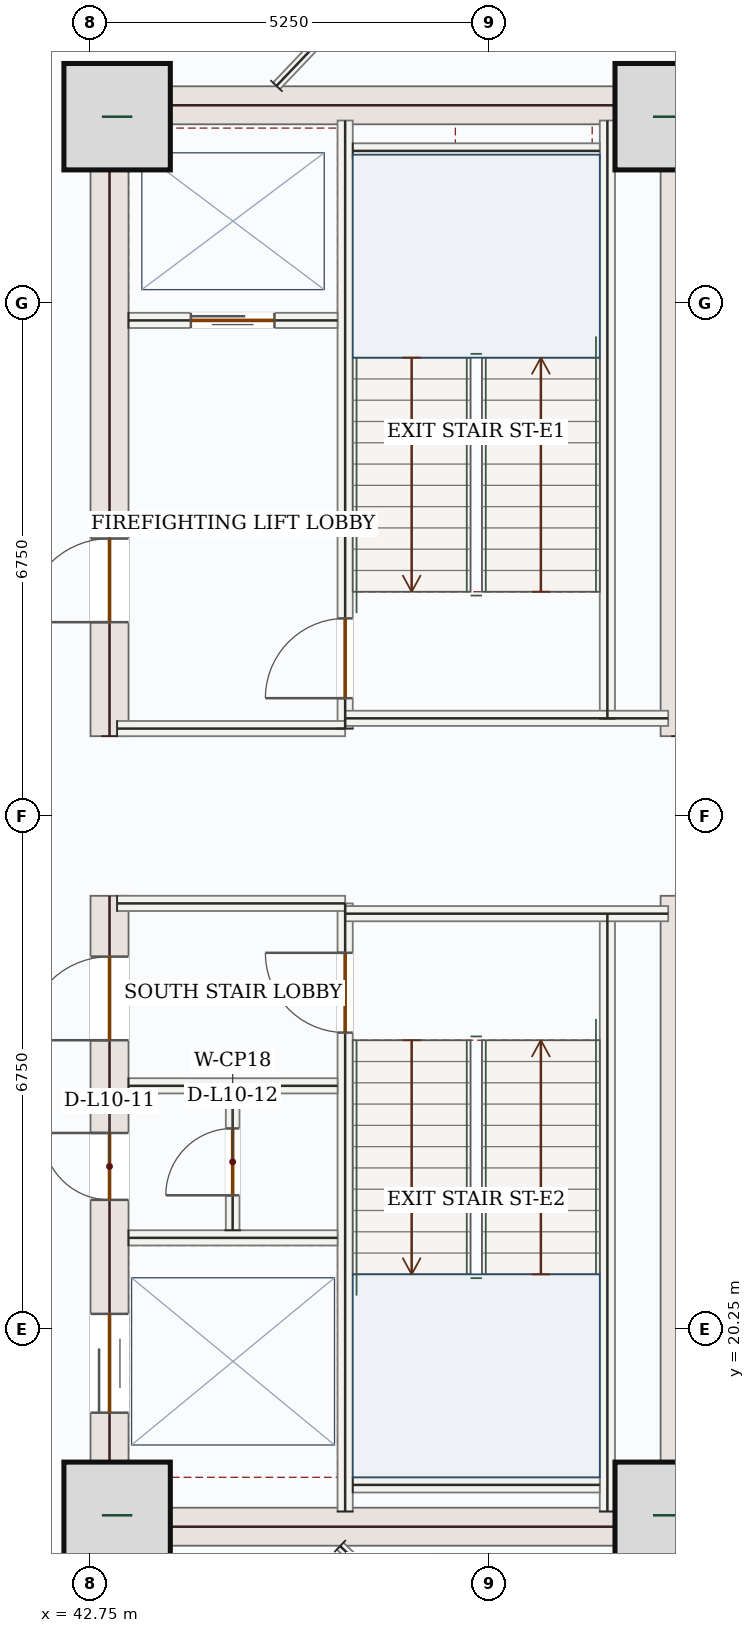
"""IFC4 building model, lengths in metres.
Left out: names, types, materials, properties, quantities, classifications, styles, units other than length and angle.
Written with IfcOpenShell. Run it as: python <this file> out.ifc"""

import sys

from ifc_helpers import new_model, si_unit, direction, frame, frame_2d, origin, origin_2d, place, context, subcontext, project, spatial, rectangle, extrude, source, transform, mapped, element, fill, save


model = new_model("IFC4")
c1 = context("Model", 3, precision=1e-05, world=origin(), true_north=direction((0.0, 1.0)))
c2 = subcontext(c1, "Body", "Model", "MODEL_VIEW")
j1 = project(units=[si_unit("LENGTHUNIT", "METRE"), si_unit("PLANEANGLEUNIT", "RADIAN")], contexts=[c1])
p1 = place(None, origin())
s1 = spatial("IfcSite", under=j1, at=p1, CompositionType="ELEMENT")
p2 = place(p1, origin())
s2 = spatial("IfcBuilding", under=s1, at=p2, CompositionType="ELEMENT")
p3 = place(p2, frame((0.0, 0.0, 50.1)))
s3 = spatial("IfcBuildingStorey", under=s2, at=p3, CompositionType="ELEMENT", Elevation=50.1)
p4 = place(p3, frame((43.0, 17.4, 0.0), z_axis=(0.0, 0.0, 1.0), x_axis=(0.0, 1.0, 0.0)))
e1 = element("IfcWall", 1, at=p4, inside=s3, PredefinedType="SHEAR", context=c2, shape_type="SweptSolid", body=[
    extrude(rectangle(XDim=8.55, YDim=0.5, at=frame_2d((4.275, 0.0))), origin(), (0.0, 0.0, 1.0), 3.95),
])
p5 = place(p4, frame((6.65, 0.0, 0.0)))
e2 = element("IfcOpeningElement", 2, at=p5, cuts=e1, PredefinedType="OPENING", context=c2, shape_type="SweptSolid", body=[
    extrude(rectangle(XDim=1.1, YDim=2.2, at=frame_2d((0.55, 1.1))), frame((0.0, 0.26, 0.0), z_axis=(0.0, -1.0, 0.0), x_axis=(1.0, 0.0, 0.0)), (0.0, 0.0, 1.0), 0.52),
])
p6 = place(p4, frame((1.75, 0.0, 0.0)))
e3 = element("IfcOpeningElement", 3, at=p6, cuts=e1, PredefinedType="OPENING", context=c2, shape_type="SweptSolid", body=[
    extrude(rectangle(XDim=1.3, YDim=2.2, at=frame_2d((0.65, 1.1))), frame((0.0, 0.26, 0.0), z_axis=(0.0, -1.0, 0.0), x_axis=(1.0, 0.0, 0.0)), (0.0, 0.0, 1.0), 0.52),
])
p7 = place(p4, frame((4.55, 0.0, 0.0)))
e4 = element("IfcOpeningElement", 4, at=p7, cuts=e1, PredefinedType="OPENING", context=c2, shape_type="SweptSolid", body=[
    extrude(rectangle(XDim=0.88, YDim=2.1, at=frame_2d((0.44, 1.05))), frame((0.0, 0.26, 0.0), z_axis=(0.0, -1.0, 0.0), x_axis=(1.0, 0.0, 0.0)), (0.0, 0.0, 1.0), 0.52),
])
p8 = place(p3, frame((43.0, 28.05, 0.0), z_axis=(0.0, 0.0, 1.0), x_axis=(0.0, 1.0, 0.0)))
e5 = element("IfcWall", 5, at=p8, inside=s3, PredefinedType="SHEAR", context=c2, shape_type="SweptSolid", body=[
    extrude(rectangle(XDim=8.55, YDim=0.5, at=frame_2d((4.275, 0.0))), origin(), (0.0, 0.0, 1.0), 3.95),
])
p9 = place(p8, frame((1.5, 0.0, 0.0)))
e6 = element("IfcOpeningElement", 6, at=p9, cuts=e5, PredefinedType="OPENING", context=c2, shape_type="SweptSolid", body=[
    extrude(rectangle(XDim=1.1, YDim=2.2, at=frame_2d((0.55, 1.1))), frame((0.0, 0.26, 0.0), z_axis=(0.0, -1.0, 0.0), x_axis=(1.0, 0.0, 0.0)), (0.0, 0.0, 1.0), 0.52),
])
m1 = source(origin(), c2, "Body", "SweptSolid", [
    extrude(rectangle(XDim=8.55, YDim=0.5, at=frame_2d((4.275, 0.0))), origin(), (0.0, 0.0, 1.0), 3.95),
])
for number, where, z_axis, x_axis in (
    (7, (50.5, 17.4, 0.0), (0.0, 0.0, 1.0), (0.0, 1.0, 0.0)),
    (8, (50.5, 28.05, 0.0), (0.0, 0.0, 1.0), (0.0, 1.0, 0.0)),
):
    element("IfcWall", number, at=place(p3, frame(where, z_axis=z_axis, x_axis=x_axis)), inside=s3, PredefinedType="SHEAR", context=c2, shape_type="MappedRepresentation", body=[
        mapped(m1, transform((0.0, 0.0, 0.0), x_axis=(1.0, 0.0, 0.0), y_axis=(0.0, 1.0, 0.0), z_axis=(0.0, 0.0, 1.0), scale=1.0)),
    ])
m2 = source(origin(), c2, "Body", "SweptSolid", [
    extrude(rectangle(XDim=7.0, YDim=0.5, at=frame_2d((3.5, 0.0))), origin(), (0.0, 0.0, 1.0), 3.95),
])
for number, where, z_axis, x_axis in (
    (9, (43.25, 17.65, 0.0), (0.0, 0.0, 1.0), (1.0, 0.0, 0.0)),
    (10, (43.25, 36.35, 0.0), (0.0, 0.0, 1.0), (1.0, 0.0, 0.0)),
):
    element("IfcWall", number, at=place(p3, frame(where, z_axis=z_axis, x_axis=x_axis)), inside=s3, PredefinedType="SHEAR", context=c2, shape_type="MappedRepresentation", body=[
        mapped(m2, transform((0.0, 0.0, 0.0), x_axis=(1.0, 0.0, 0.0), y_axis=(0.0, 1.0, 0.0), z_axis=(0.0, 0.0, 1.0), scale=1.0)),
    ])
m3 = source(origin(), c2, "Body", "SweptSolid", [
    extrude(rectangle(XDim=1.4, YDim=1.4, at=origin_2d()), origin(), (0.0, 0.0, 1.0), 4.2),
])
for number, where, z_axis, x_axis in (
    (11, (43.1, 17.8, 0.0), (0.0, 0.0, 1.0), (1.0, 0.0, 0.0)),
    (12, (50.35, 17.8, 0.0), (0.0, 0.0, 1.0), (1.0, 0.0, 0.0)),
    (13, (43.1, 36.2, 0.0), (0.0, 0.0, 1.0), (1.0, 0.0, 0.0)),
    (14, (50.35, 36.2, 0.0), (0.0, 0.0, 1.0), (1.0, 0.0, 0.0)),
):
    element("IfcColumn", number, at=place(p3, frame(where, z_axis=z_axis, x_axis=x_axis)), inside=s3, PredefinedType="COLUMN", context=c2, shape_type="MappedRepresentation", body=[
        mapped(m3, transform((0.0, 0.0, 0.0), x_axis=(1.0, 0.0, 0.0), y_axis=(0.0, 1.0, 0.0), z_axis=(0.0, 0.0, 1.0), scale=1.0)),
    ])
p10 = place(p3, frame((53.06, 18.458, 0.0), z_axis=(0.0, 0.0, 1.0), x_axis=(-0.707106781187, -0.707106781187, 0.0)))
e15 = element("IfcWall", 15, at=p10, inside=s3, PredefinedType="SOLIDWALL", context=c2, shape_type="SweptSolid", body=[
    extrude(rectangle(XDim=5.258, YDim=0.32, at=frame_2d((2.629, 0.0))), origin(), (0.0, 0.0, 1.0), 3.95),
])
p11 = place(p10, frame((1.429, 0.0, 0.85)))
e16 = element("IfcOpeningElement", 16, at=p11, cuts=e15, PredefinedType="OPENING", context=c2, shape_type="SweptSolid", body=[
    extrude(rectangle(XDim=2.4, YDim=1.8, at=frame_2d((1.2, 0.9))), frame((0.0, 0.17, 0.0), z_axis=(0.0, -1.0, 0.0), x_axis=(1.0, 0.0, 0.0)), (0.0, 0.0, 1.0), 0.34),
])
m4 = source(origin(), c2, "Body", "SweptSolid", [
    extrude(rectangle(XDim=5.258, YDim=0.32, at=frame_2d((2.629, 0.0))), origin(), (0.0, 0.0, 1.0), 3.95),
])
p12 = place(p3, frame((49.342, 39.26, 0.0), z_axis=(0.0, 0.0, 1.0), x_axis=(0.707106781187, -0.707106781187, 0.0)))
e17 = element("IfcWall", 17, at=p12, inside=s3, PredefinedType="SOLIDWALL", context=c2, shape_type="MappedRepresentation", body=[
    mapped(m4, transform((0.0, 0.0, 0.0), x_axis=(1.0, 0.0, 0.0), y_axis=(0.0, 1.0, 0.0), z_axis=(0.0, 0.0, 1.0), scale=1.0)),
])
m5 = source(origin(), c2, "Body", "SweptSolid", [
    extrude(rectangle(XDim=7.87, YDim=0.2, at=frame_2d((3.935, 0.0))), origin(), (0.0, 0.0, 1.0), 3.95),
])
for number, where, z_axis, x_axis in (
    (18, (49.55, 17.85, 0.0), (0.0, 0.0, 1.0), (0.0, 1.0, 0.0)),
    (19, (49.55, 28.28, 0.0), (0.0, 0.0, 1.0), (0.0, 1.0, 0.0)),
):
    element("IfcWall", number, at=place(p3, frame(where, z_axis=z_axis, x_axis=x_axis)), inside=s3, PredefinedType="SOLIDWALL", context=c2, shape_type="MappedRepresentation", body=[
        mapped(m5, transform((0.0, 0.0, 0.0), x_axis=(1.0, 0.0, 0.0), y_axis=(0.0, 1.0, 0.0), z_axis=(0.0, 0.0, 1.0), scale=1.0)),
    ])
p13 = place(p3, frame((46.1, 17.85, 0.0), z_axis=(0.0, 0.0, 1.0), x_axis=(0.0, 1.0, 0.0)))
e20 = element("IfcWall", 20, at=p13, inside=s3, PredefinedType="SOLIDWALL", context=c2, shape_type="SweptSolid", body=[
    extrude(rectangle(XDim=8.0, YDim=0.2, at=frame_2d((4.0, 0.0))), origin(), (0.0, 0.0, 1.0), 3.95),
])
p14 = place(p13, frame((6.3, 0.0, 0.0)))
e21 = element("IfcOpeningElement", 21, at=p14, cuts=e20, PredefinedType="OPENING", context=c2, shape_type="SweptSolid", body=[
    extrude(rectangle(XDim=1.05, YDim=2.15, at=frame_2d((0.525, 1.075))), frame((0.0, 0.11, 0.0), z_axis=(0.0, -1.0, 0.0), x_axis=(1.0, 0.0, 0.0)), (0.0, 0.0, 1.0), 0.22),
])
p15 = place(p3, frame((46.1, 28.15, 0.0), z_axis=(0.0, 0.0, 1.0), x_axis=(0.0, 1.0, 0.0)))
e22 = element("IfcWall", 22, at=p15, inside=s3, PredefinedType="SOLIDWALL", context=c2, shape_type="SweptSolid", body=[
    extrude(rectangle(XDim=8.0, YDim=0.2, at=frame_2d((4.0, 0.0))), origin(), (0.0, 0.0, 1.0), 3.95),
])
p16 = place(p15, frame((0.4, 0.0, 0.0)))
e23 = element("IfcOpeningElement", 23, at=p16, cuts=e22, PredefinedType="OPENING", context=c2, shape_type="SweptSolid", body=[
    extrude(rectangle(XDim=1.05, YDim=2.15, at=frame_2d((0.525, 1.075))), frame((0.0, 0.11, 0.0), z_axis=(0.0, -1.0, 0.0), x_axis=(1.0, 0.0, 0.0)), (0.0, 0.0, 1.0), 0.22),
])
m6 = source(origin(), c2, "Body", "SweptSolid", [
    extrude(rectangle(XDim=3.0, YDim=0.2, at=frame_2d((1.5, 0.0))), origin(), (0.0, 0.0, 1.0), 3.95),
])
p17 = place(p3, frame((43.1, 25.85, 0.0), z_axis=(0.0, 0.0, 1.0), x_axis=(1.0, 0.0, 0.0)))
e24 = element("IfcWall", 24, at=p17, inside=s3, PredefinedType="SOLIDWALL", context=c2, shape_type="MappedRepresentation", body=[
    mapped(m6, transform((0.0, 0.0, 0.0), x_axis=(1.0, 0.0, 0.0), y_axis=(0.0, 1.0, 0.0), z_axis=(0.0, 0.0, 1.0), scale=1.0)),
])
m7 = source(origin(), c2, "Body", "SweptSolid", [
    extrude(rectangle(XDim=4.25, YDim=0.2, at=frame_2d((2.125, 0.0))), origin(), (0.0, 0.0, 1.0), 3.95),
])
p18 = place(p3, frame((46.1, 25.715, 0.0), z_axis=(0.0, 0.0, 1.0), x_axis=(1.0, 0.0, 0.0)))
e25 = element("IfcWall", 25, at=p18, inside=s3, PredefinedType="SOLIDWALL", context=c2, shape_type="MappedRepresentation", body=[
    mapped(m7, transform((0.0, 0.0, 0.0), x_axis=(1.0, 0.0, 0.0), y_axis=(0.0, 1.0, 0.0), z_axis=(0.0, 0.0, 1.0), scale=1.0)),
])
p19 = place(p3, frame((43.1, 28.15, 0.0), z_axis=(0.0, 0.0, 1.0), x_axis=(1.0, 0.0, 0.0)))
e26 = element("IfcWall", 26, at=p19, inside=s3, PredefinedType="SOLIDWALL", context=c2, shape_type="MappedRepresentation", body=[
    mapped(m6, transform((0.0, 0.0, 0.0), x_axis=(1.0, 0.0, 0.0), y_axis=(0.0, 1.0, 0.0), z_axis=(0.0, 0.0, 1.0), scale=1.0)),
])
p20 = place(p3, frame((46.1, 28.285, 0.0), z_axis=(0.0, 0.0, 1.0), x_axis=(1.0, 0.0, 0.0)))
e27 = element("IfcWall", 27, at=p20, inside=s3, PredefinedType="SOLIDWALL", context=c2, shape_type="MappedRepresentation", body=[
    mapped(m7, transform((0.0, 0.0, 0.0), x_axis=(1.0, 0.0, 0.0), y_axis=(0.0, 1.0, 0.0), z_axis=(0.0, 0.0, 1.0), scale=1.0)),
])
m8 = source(origin(), c2, "Body", "SweptSolid", [
    extrude(rectangle(XDim=3.25, YDim=0.2, at=frame_2d((1.625, 0.0))), origin(), (0.0, 0.0, 1.0), 3.95),
])
for number, where, z_axis, x_axis in (
    (28, (46.2, 35.75, 0.0), (0.0, 0.0, 1.0), (1.0, 0.0, 0.0)),
    (29, (46.2, 18.2, 0.0), (0.0, 0.0, 1.0), (1.0, 0.0, 0.0)),
):
    element("IfcWall", number, at=place(p3, frame(where, z_axis=z_axis, x_axis=x_axis)), inside=s3, PredefinedType="SOLIDWALL", context=c2, shape_type="MappedRepresentation", body=[
        mapped(m8, transform((0.0, 0.0, 0.0), x_axis=(1.0, 0.0, 0.0), y_axis=(0.0, 1.0, 0.0), z_axis=(0.0, 0.0, 1.0), scale=1.0)),
    ])
p21 = place(p3, frame((43.25, 33.52, 0.0), z_axis=(0.0, 0.0, 1.0), x_axis=(1.0, 0.0, 0.0)))
e30 = element("IfcWall", 30, at=p21, inside=s3, PredefinedType="SOLIDWALL", context=c2, shape_type="SweptSolid", body=[
    extrude(rectangle(XDim=2.75, YDim=0.2, at=frame_2d((1.375, 0.0))), origin(), (0.0, 0.0, 1.0), 3.95),
])
p22 = place(p21, frame((0.82, 0.0, 0.0)))
e31 = element("IfcOpeningElement", 31, at=p22, cuts=e30, PredefinedType="OPENING", context=c2, shape_type="SweptSolid", body=[
    extrude(rectangle(XDim=1.1, YDim=2.15, at=frame_2d((0.55, 1.075))), frame((0.0, 0.11, 0.0), z_axis=(0.0, -1.0, 0.0), x_axis=(1.0, 0.0, 0.0)), (0.0, 0.0, 1.0), 0.22),
])
m9 = source(origin(), c2, "Body", "SweptSolid", [
    extrude(rectangle(XDim=2.75, YDim=0.2, at=frame_2d((1.375, 0.0))), origin(), (0.0, 0.0, 1.0), 3.95),
])
for number, where, z_axis, x_axis in (
    (32, (43.25, 23.45, 0.0), (0.0, 0.0, 1.0), (1.0, 0.0, 0.0)),
    (33, (43.25, 21.45, 0.0), (0.0, 0.0, 1.0), (1.0, 0.0, 0.0)),
):
    element("IfcWall", number, at=place(p3, frame(where, z_axis=z_axis, x_axis=x_axis)), inside=s3, PredefinedType="SOLIDWALL", context=c2, shape_type="MappedRepresentation", body=[
        mapped(m9, transform((0.0, 0.0, 0.0), x_axis=(1.0, 0.0, 0.0), y_axis=(0.0, 1.0, 0.0), z_axis=(0.0, 0.0, 1.0), scale=1.0)),
    ])
p23 = place(p3, frame((44.62, 21.55, 0.0), z_axis=(0.0, 0.0, 1.0), x_axis=(0.0, 1.0, 0.0)))
e34 = element("IfcWall", 34, at=p23, inside=s3, PredefinedType="PARTITIONING", context=c2, shape_type="SweptSolid", body=[
    extrude(rectangle(XDim=1.8, YDim=0.18, at=frame_2d((0.9, 0.0))), origin(), (0.0, 0.0, 1.0), 3.95),
])
p24 = place(p23, frame((0.46, 0.0, 0.0)))
e35 = element("IfcOpeningElement", 35, at=p24, cuts=e34, PredefinedType="OPENING", context=c2, shape_type="SweptSolid", body=[
    extrude(rectangle(XDim=0.88, YDim=2.1, at=frame_2d((0.44, 1.05))), frame((0.0, 0.1, 0.0), z_axis=(0.0, -1.0, 0.0), x_axis=(1.0, 0.0, 0.0)), (0.0, 0.0, 1.0), 0.2),
])
m10 = source(origin(), c2, "Body", "SweptSolid", [
    extrude(rectangle(XDim=1.715, YDim=0.125, at=frame_2d((0.857, 0.0))), origin(), (0.0, 0.0, 1.0), 3.95),
])
p25 = place(p3, frame((46.034, 17.395, 0.0), z_axis=(0.0, 0.0, 1.0), x_axis=(0.724259786069, -0.689527201989, 0.0)))
e36 = element("IfcWall", 36, at=p25, inside=s3, PredefinedType="PARTITIONING", context=c2, shape_type="MappedRepresentation", body=[
    mapped(m10, transform((0.0, 0.0, 0.0), x_axis=(1.0, 0.0, 0.0), y_axis=(0.0, 1.0, 0.0), z_axis=(0.0, 0.0, 1.0), scale=1.0)),
])
m11 = source(origin(), c2, "Body", "SweptSolid", [
    extrude(rectangle(XDim=3.438, YDim=0.125, at=frame_2d((1.719, 0.0))), origin(), (0.0, 0.0, 1.0), 3.95),
])
p26 = place(p3, frame((45.197, 36.605, 0.0), z_axis=(0.0, 0.0, 1.0), x_axis=(0.689493786127, 0.724291597972, 0.0)))
e37 = element("IfcWall", 37, at=p26, inside=s3, PredefinedType="PARTITIONING", context=c2, shape_type="MappedRepresentation", body=[
    mapped(m11, transform((0.0, 0.0, 0.0), x_axis=(1.0, 0.0, 0.0), y_axis=(0.0, 1.0, 0.0), z_axis=(0.0, 0.0, 1.0), scale=1.0)),
])
m12 = source(origin(), c2, "Body", "SweptSolid", [
    extrude(rectangle(XDim=2.4, YDim=1.8, at=frame_2d((1.2, 0.9))), frame((0.0, 0.03, 0.0), z_axis=(0.0, -1.0, 0.0), x_axis=(1.0, 0.0, 0.0)), (0.0, 0.0, 1.0), 0.06),
])
p27 = place(p11, origin())
e38 = element("IfcWindow", 38, at=p27, inside=s3, PartitioningType="DOUBLE_PANEL_VERTICAL", PredefinedType="WINDOW", context=c2, shape_type="MappedRepresentation", body=[
    mapped(m12, transform((0.0, 0.0, 0.0), x_axis=(1.0, 0.0, 0.0), y_axis=(0.0, 1.0, 0.0), z_axis=(0.0, 0.0, 1.0), scale=1.0)),
])
fill(e16, e38)
m13 = source(origin(), c2, "Body", "SweptSolid", [
    extrude(rectangle(XDim=1.05, YDim=2.15, at=frame_2d((0.525, 1.075))), frame((0.0, 0.025, 0.0), z_axis=(0.0, -1.0, 0.0), x_axis=(1.0, 0.0, 0.0)), (0.0, 0.0, 1.0), 0.05),
])
p28 = place(p16, origin())
e39 = element("IfcDoor", 39, at=p28, inside=s3, OperationType="SINGLE_SWING_LEFT", PredefinedType="DOOR", context=c2, shape_type="MappedRepresentation", body=[
    mapped(m13, transform((0.0, 0.0, 0.0), x_axis=(1.0, 0.0, 0.0), y_axis=(0.0, 1.0, 0.0), z_axis=(0.0, 0.0, 1.0), scale=1.0)),
])
fill(e23, e39)
p29 = place(p14, origin())
e40 = element("IfcDoor", 40, at=p29, inside=s3, OperationType="SINGLE_SWING_RIGHT", PredefinedType="DOOR", context=c2, shape_type="MappedRepresentation", body=[
    mapped(m13, transform((0.0, 0.0, 0.0), x_axis=(1.0, 0.0, 0.0), y_axis=(0.0, 1.0, 0.0), z_axis=(0.0, 0.0, 1.0), scale=1.0)),
])
fill(e21, e40)
m14 = source(origin(), c2, "Body", "SweptSolid", [
    extrude(rectangle(XDim=1.1, YDim=2.15, at=frame_2d((0.55, 1.075))), frame((0.0, 0.025, 0.0), z_axis=(0.0, -1.0, 0.0), x_axis=(1.0, 0.0, 0.0)), (0.0, 0.0, 1.0), 0.05),
])
p30 = place(p22, origin())
e41 = element("IfcDoor", 41, at=p30, inside=s3, OperationType="DOUBLE_DOOR_SLIDING", PredefinedType="DOOR", context=c2, shape_type="MappedRepresentation", body=[
    mapped(m14, transform((0.0, 0.0, 0.0), x_axis=(1.0, 0.0, 0.0), y_axis=(0.0, 1.0, 0.0), z_axis=(0.0, 0.0, 1.0), scale=1.0)),
])
fill(e31, e41)
m15 = source(origin(), c2, "Body", "SweptSolid", [
    extrude(rectangle(XDim=1.1, YDim=2.2, at=frame_2d((0.55, 1.1))), frame((0.0, 0.025, 0.0), z_axis=(0.0, -1.0, 0.0), x_axis=(1.0, 0.0, 0.0)), (0.0, 0.0, 1.0), 0.05),
])
p31 = place(p9, origin())
e42 = element("IfcDoor", 42, at=p31, inside=s3, OperationType="SINGLE_SWING_LEFT", PredefinedType="DOOR", context=c2, shape_type="MappedRepresentation", body=[
    mapped(m15, transform((0.0, 0.0, 0.0), x_axis=(1.0, 0.0, 0.0), y_axis=(0.0, 1.0, 0.0), z_axis=(0.0, 0.0, 1.0), scale=1.0)),
])
fill(e6, e42)
p32 = place(p5, origin())
e43 = element("IfcDoor", 43, at=p32, inside=s3, OperationType="SINGLE_SWING_LEFT", PredefinedType="DOOR", context=c2, shape_type="MappedRepresentation", body=[
    mapped(m15, transform((0.0, 0.0, 0.0), x_axis=(1.0, 0.0, 0.0), y_axis=(0.0, 1.0, 0.0), z_axis=(0.0, 0.0, 1.0), scale=1.0)),
])
fill(e2, e43)
m16 = source(origin(), c2, "Body", "SweptSolid", [
    extrude(rectangle(XDim=1.3, YDim=2.2, at=frame_2d((0.65, 1.1))), frame((0.0, 0.025, 0.0), z_axis=(0.0, -1.0, 0.0), x_axis=(1.0, 0.0, 0.0)), (0.0, 0.0, 1.0), 0.05),
])
p33 = place(p6, origin())
e44 = element("IfcDoor", 44, at=p33, inside=s3, OperationType="DOUBLE_DOOR_SLIDING", PredefinedType="DOOR", context=c2, shape_type="MappedRepresentation", body=[
    mapped(m16, transform((0.0, 0.0, 0.0), x_axis=(1.0, 0.0, 0.0), y_axis=(0.0, 1.0, 0.0), z_axis=(0.0, 0.0, 1.0), scale=1.0)),
])
fill(e3, e44)
m17 = source(origin(), c2, "Body", "SweptSolid", [
    extrude(rectangle(XDim=0.88, YDim=2.1, at=frame_2d((0.44, 1.05))), frame((0.0, 0.025, 0.0), z_axis=(0.0, -1.0, 0.0), x_axis=(1.0, 0.0, 0.0)), (0.0, 0.0, 1.0), 0.05),
])
p34 = place(p7, origin())
e45 = element("IfcDoor", 45, at=p34, inside=s3, OperationType="SINGLE_SWING_RIGHT", PredefinedType="DOOR", context=c2, shape_type="MappedRepresentation", body=[
    mapped(m17, transform((0.0, 0.0, 0.0), x_axis=(1.0, 0.0, 0.0), y_axis=(0.0, 1.0, 0.0), z_axis=(0.0, 0.0, 1.0), scale=1.0)),
])
fill(e4, e45)
p35 = place(p24, origin())
e46 = element("IfcDoor", 46, at=p35, inside=s3, OperationType="SINGLE_SWING_LEFT", PredefinedType="DOOR", context=c2, shape_type="MappedRepresentation", body=[
    mapped(m17, transform((0.0, 0.0, 0.0), x_axis=(1.0, 0.0, 0.0), y_axis=(0.0, 1.0, 0.0), z_axis=(0.0, 0.0, 1.0), scale=1.0)),
])
fill(e35, e46)
save(model, sys.argv[1])
